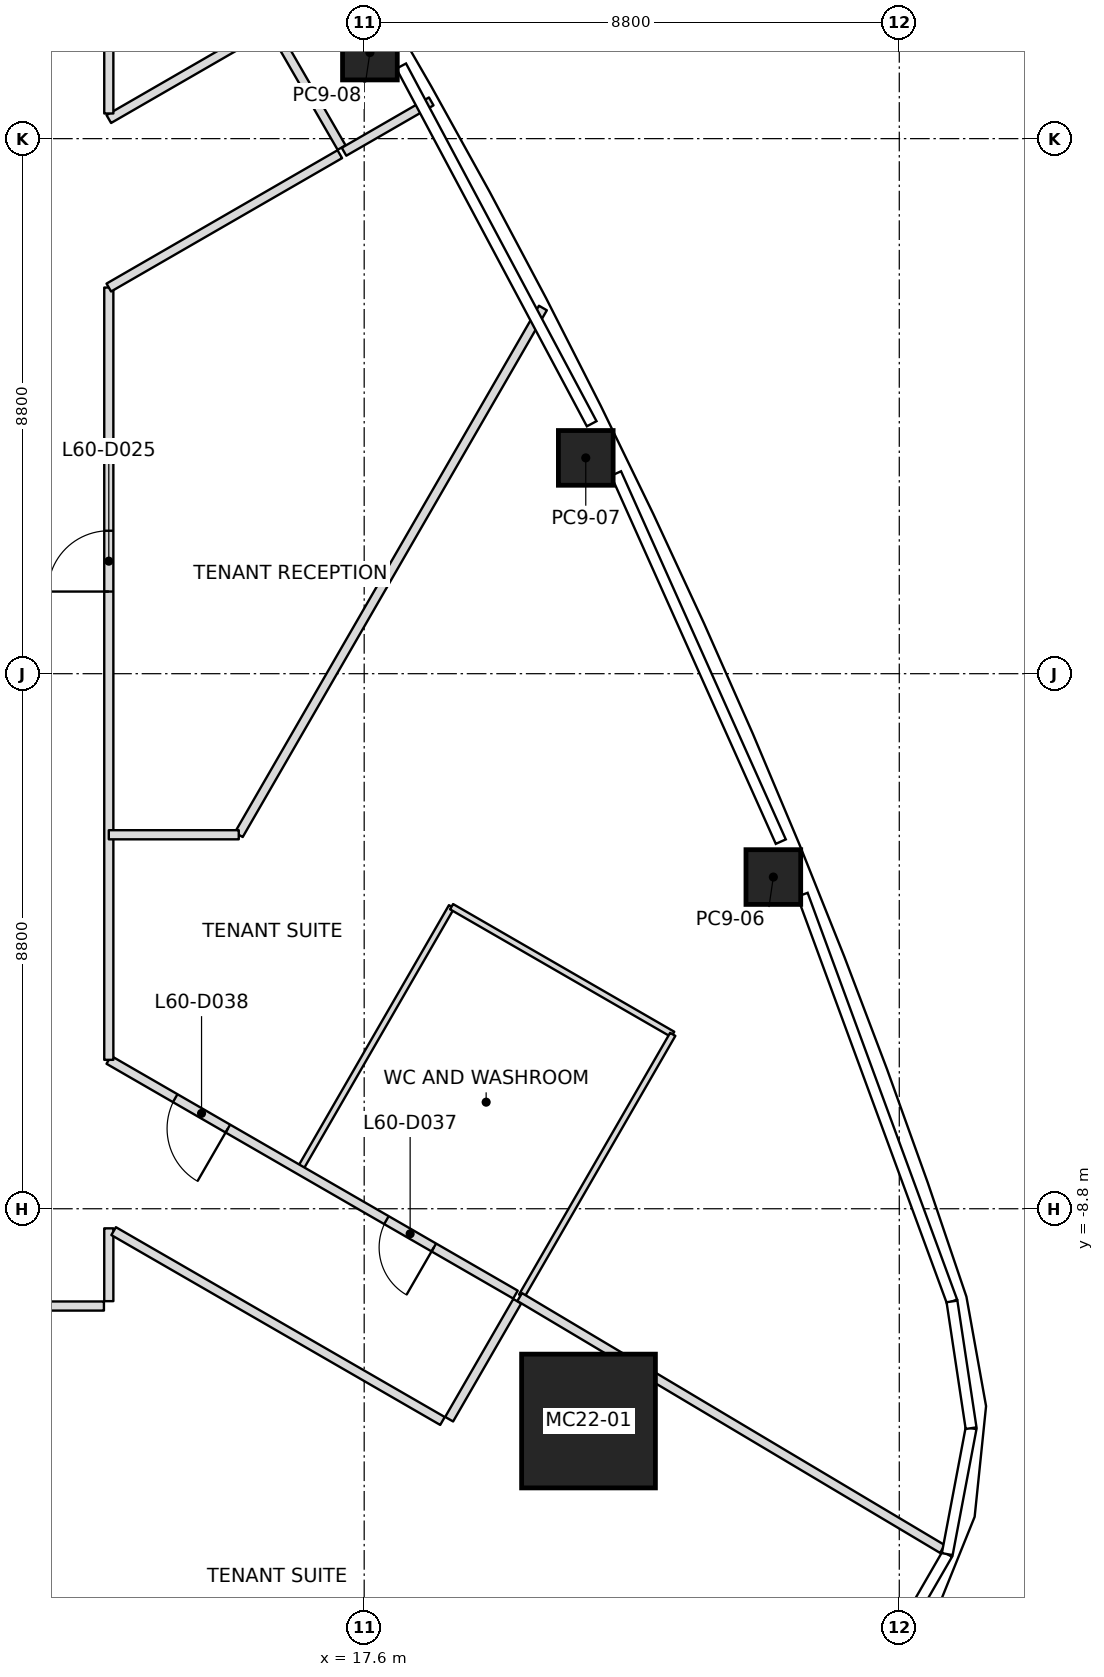
"""IFC4 building model, lengths in metres.
Left out: names, types, materials, properties, quantities, classifications, styles, units other than length and angle.
Written with IfcOpenShell. Run it as: python <this file> out.ifc"""

import sys

from ifc_helpers import new_model, si_unit, direction, frame, frame_2d, origin, origin_2d, place, context, subcontext, project, spatial, rectangle, extrude, element, fill, save


model = new_model("IFC4")
c1 = context("Model", 3, precision=1e-05, world=origin(), true_north=direction((0.0, 1.0)))
c2 = subcontext(c1, "Body", "Model", "MODEL_VIEW")
j1 = project(units=[si_unit("LENGTHUNIT", "METRE"), si_unit("PLANEANGLEUNIT", "RADIAN")], contexts=[c1])
p1 = place(None, origin())
s1 = spatial("IfcSite", under=j1, at=p1, CompositionType="ELEMENT")
p2 = place(p1, origin())
s2 = spatial("IfcBuilding", under=s1, at=p2, CompositionType="ELEMENT")
p3 = place(p2, frame((0.0, 0.0, 267.0)))
s3 = spatial("IfcBuildingStorey", under=s2, at=p3, CompositionType="ELEMENT", Elevation=267.0)
p4 = place(p3, frame((21.289, -12.291, 0.0), z_axis=(-0.027817676907, 0.016043967164, 0.999484250986), x_axis=(0.999613013546, 0.000446478676, 0.027814093645)))
e1 = element("IfcColumn", 1, at=p4, inside=s3, PredefinedType="COLUMN", context=c2, shape_type="SweptSolid", body=[
    extrude(rectangle(XDim=2.2, YDim=2.2, at=origin_2d()), origin(), (0.0, 0.0, 1.0), 4.002),
])
p5 = place(p3, frame((24.329, -3.344, 0.0), z_axis=(-0.017757551143, 0.009946669541, 0.999792845115), x_axis=(-0.376861693588, 0.926132938269, -0.015907374376)))
e2 = element("IfcColumn", 2, at=p5, inside=s3, PredefinedType="COLUMN", context=c2, shape_type="SweptSolid", body=[
    extrude(rectangle(XDim=0.9, YDim=0.9, at=origin_2d()), origin(), (0.0, 0.0, 1.0), 4.001),
])
p6 = place(p3, frame((21.244, 3.549, 0.0), z_axis=(-0.014097691364, 0.002013955909, 0.999898594398), x_axis=(-0.439450311586, 0.8982312302, -0.008005044713)))
e3 = element("IfcColumn", 3, at=p6, inside=s3, PredefinedType="COLUMN", context=c2, shape_type="SweptSolid", body=[
    extrude(rectangle(XDim=0.9, YDim=0.9, at=origin_2d()), origin(), (0.0, 0.0, 1.0), 4.0),
])
p7 = place(p3, frame((17.694, 10.216, 0.0), z_axis=(-0.009887049298, -0.00573692984, 0.999934664812), x_axis=(-0.499975560967, 0.866039512843, 2.5126546e-05)))
e4 = element("IfcColumn", 4, at=p7, inside=s3, PredefinedType="COLUMN", context=c2, shape_type="SweptSolid", body=[
    extrude(rectangle(XDim=0.9, YDim=0.9, at=origin_2d()), origin(), (0.0, 0.0, 1.0), 4.0),
])
p8 = place(p3, frame((20.539, 6.014, 0.0), z_axis=(0.0, 0.0, 1.0), x_axis=(-0.500021018371, -0.866013268482, 0.0)))
e5 = element("IfcWall", 5, at=p8, inside=s3, PredefinedType="PARTITIONING", context=c2, shape_type="SweptSolid", body=[
    extrude(rectangle(XDim=10.004, YDim=0.15, at=frame_2d((5.002, 0.0))), origin(), (0.0, 0.0, 1.0), 3.234),
])
p9 = place(p3, frame((15.537, -2.649, 0.0), z_axis=(0.0, 0.0, 1.0), x_axis=(-1.0, 0.0, 0.0)))
e6 = element("IfcWall", 6, at=p9, inside=s3, PredefinedType="PARTITIONING", context=c2, shape_type="SweptSolid", body=[
    extrude(rectangle(XDim=2.137, YDim=0.15, at=frame_2d((1.069, 0.0))), origin(), (0.0, 0.0, 1.0), 3.317),
])
p10 = place(p3, frame((17.268, 8.584, 0.0), z_axis=(0.0, 0.0, 1.0), x_axis=(0.866021116422, 0.500007425856, 0.0)))
e7 = element("IfcWall", 7, at=p10, inside=s3, PredefinedType="PARTITIONING", context=c2, shape_type="SweptSolid", body=[
    extrude(rectangle(XDim=1.656, YDim=0.15, at=frame_2d((0.828, 0.0))), origin(), (0.0, 0.0, 1.0), 3.234),
])
p11 = place(p3, frame((20.157, -10.252, 0.0), z_axis=(0.0, 0.0, 1.0), x_axis=(0.858979887648, -0.512009328641, 0.0)))
e8 = element("IfcWall", 8, at=p11, inside=s3, PredefinedType="PARTITIONING", context=c2, shape_type="SweptSolid", body=[
    extrude(rectangle(XDim=8.093, YDim=0.15, at=frame_2d((4.047, 0.0))), origin(), (0.0, 0.0, 1.0), 3.234),
])
p12 = place(p3, frame((1.2, -10.4, 0.0), z_axis=(0.0, 0.0, 1.0), x_axis=(1.0, 0.0, 0.0)))
e9 = element("IfcWall", 9, at=p12, inside=s3, PredefinedType="PARTITIONING", context=c2, shape_type="SweptSolid", body=[
    extrude(rectangle(XDim=12.12, YDim=0.15, at=frame_2d((6.06, 0.0))), origin(), (0.0, 0.0, 1.0), 3.317),
])
p13 = place(p12, frame((1.65, 0.0, 0.0)))
e10 = element("IfcOpeningElement", 10, at=p13, cuts=e9, PredefinedType="OPENING", context=c2, shape_type="SweptSolid", body=[
    extrude(rectangle(XDim=0.9, YDim=2.1, at=frame_2d((0.45, 1.05))), frame((0.0, 0.075, 0.0), z_axis=(0.0, -1.0, 0.0), x_axis=(1.0, 0.0, 0.0)), (0.0, 0.0, 1.0), 0.15),
])
p14 = place(p12, frame((7.75, 0.0, 0.0)))
e11 = element("IfcOpeningElement", 11, at=p14, cuts=e9, PredefinedType="OPENING", context=c2, shape_type="SweptSolid", body=[
    extrude(rectangle(XDim=1.0, YDim=2.1, at=frame_2d((0.5, 1.05))), frame((0.0, 0.075, 0.0), z_axis=(0.0, -1.0, 0.0), x_axis=(1.0, 0.0, 0.0)), (0.0, 0.0, 1.0), 0.15),
])
p15 = place(p3, frame((13.4, -10.32, 0.0), z_axis=(0.0, 0.0, 1.0), x_axis=(0.0, 1.0, 0.0)))
e12 = element("IfcWall", 12, at=p15, inside=s3, PredefinedType="PARTITIONING", context=c2, shape_type="SweptSolid", body=[
    extrude(rectangle(XDim=1.198, YDim=0.15, at=frame_2d((0.599, 0.0))), origin(), (0.0, 0.0, 1.0), 3.233),
])
p16 = place(p3, frame((13.479, -9.168, 0.0), z_axis=(0.0, 0.0, 1.0), x_axis=(0.866026089583, -0.49999881216, 0.0)))
e13 = element("IfcWall", 13, at=p16, inside=s3, PredefinedType="PARTITIONING", context=c2, shape_type="SweptSolid", body=[
    extrude(rectangle(XDim=6.245, YDim=0.15, at=frame_2d((3.123, 0.0))), origin(), (0.0, 0.0, 1.0), 3.233),
])
p17 = place(p3, frame((15.999, 10.623, 0.0), z_axis=(0.0, 0.0, 1.0), x_axis=(-0.86600676862, -0.500032275663, 0.0)))
e14 = element("IfcWall", 14, at=p17, inside=s3, PredefinedType="PARTITIONING", context=c2, shape_type="SweptSolid", body=[
    extrude(rectangle(XDim=3.001, YDim=0.15, at=frame_2d((1.5, 0.0))), origin(), (0.0, 0.0, 1.0), 3.45),
])
p18 = place(p3, frame((13.4, 9.214, 0.0), z_axis=(0.0, 0.0, 1.0), x_axis=(0.0, 1.0, 0.0)))
e15 = element("IfcWall", 15, at=p18, inside=s3, PredefinedType="PARTITIONING", context=c2, shape_type="SweptSolid", body=[
    extrude(rectangle(XDim=1.106, YDim=0.15, at=frame_2d((0.553, 0.0))), origin(), (0.0, 0.0, 1.0), 3.45),
])
p19 = place(p3, frame((17.229, 8.654, 0.0), z_axis=(0.0, 0.0, 1.0), x_axis=(-0.500030632641, 0.866007717299, 0.0)))
e16 = element("IfcWall", 16, at=p19, inside=s3, PredefinedType="PARTITIONING", context=c2, shape_type="SweptSolid", body=[
    extrude(rectangle(XDim=2.24, YDim=0.15, at=frame_2d((1.12, 0.0))), origin(), (0.0, 0.0, 1.0), 3.45),
])
p20 = place(p3, frame((20.088, -10.212, 0.0), z_axis=(0.0, 0.0, 1.0), x_axis=(-0.866024490366, 0.500001582084, 0.0)))
e17 = element("IfcWall", 17, at=p20, inside=s3, PredefinedType="PARTITIONING", context=c2, shape_type="SweptSolid", body=[
    extrude(rectangle(XDim=7.723, YDim=0.15, at=frame_2d((3.861, 0.0))), origin(), (0.0, 0.0, 1.0), 3.317),
])
p21 = place(p20, frame((1.55, 0.0, 0.0)))
e18 = element("IfcOpeningElement", 18, at=p21, cuts=e17, PredefinedType="OPENING", context=c2, shape_type="SweptSolid", body=[
    extrude(rectangle(XDim=0.9, YDim=2.1, at=frame_2d((0.45, 1.05))), frame((0.0, 0.075, 0.0), z_axis=(0.0, -1.0, 0.0), x_axis=(1.0, 0.0, 0.0)), (0.0, 0.0, 1.0), 0.15),
])
p22 = place(p20, frame((5.461, 0.0, 0.0)))
e19 = element("IfcOpeningElement", 19, at=p22, cuts=e17, PredefinedType="OPENING", context=c2, shape_type="SweptSolid", body=[
    extrude(rectangle(XDim=1.0, YDim=2.1, at=frame_2d((0.5, 1.05))), frame((0.0, 0.075, 0.0), z_axis=(0.0, -1.0, 0.0), x_axis=(1.0, 0.0, 0.0)), (0.0, 0.0, 1.0), 0.15),
])
p23 = place(p3, frame((13.4, -6.351, 0.0), z_axis=(0.0, 0.0, 1.0), x_axis=(0.0, 1.0, 0.0)))
e20 = element("IfcWall", 20, at=p23, inside=s3, PredefinedType="PARTITIONING", context=c2, shape_type="SweptSolid", body=[
    extrude(rectangle(XDim=12.702, YDim=0.15, at=frame_2d((6.351, 0.0))), origin(), (0.0, 0.0, 1.0), 3.317),
])
p24 = place(p23, frame((7.702, 0.0, 0.0)))
e21 = element("IfcOpeningElement", 21, at=p24, cuts=e20, PredefinedType="OPENING", context=c2, shape_type="SweptSolid", body=[
    extrude(rectangle(XDim=1.0, YDim=2.1, at=frame_2d((0.5, 1.05))), frame((0.0, 0.075, 0.0), z_axis=(0.0, -1.0, 0.0), x_axis=(1.0, 0.0, 0.0)), (0.0, 0.0, 1.0), 0.15),
])
p25 = place(p3, frame((13.4, 6.351, 0.0), z_axis=(0.0, 0.0, 1.0), x_axis=(0.866042871377, 0.499969744021, 0.0)))
e22 = element("IfcWall", 22, at=p25, inside=s3, PredefinedType="PARTITIONING", context=c2, shape_type="SweptSolid", body=[
    extrude(rectangle(XDim=4.387, YDim=0.15, at=frame_2d((2.193, 0.0))), origin(), (0.0, 0.0, 1.0), 3.45),
])
p26 = place(p3, frame((18.997, -12.261, 0.0), z_axis=(0.0, 0.0, 1.0), x_axis=(0.500030632641, 0.866007717299, 0.0)))
e23 = element("IfcWall", 23, at=p26, inside=s3, PredefinedType="PARTITIONING", context=c2, shape_type="SweptSolid", body=[
    extrude(rectangle(XDim=2.24, YDim=0.15, at=frame_2d((1.12, 0.0))), origin(), (0.0, 0.0, 1.0), 3.233),
])
p27 = place(p3, frame((16.552, -8.136, 0.0), z_axis=(0.0, 0.0, 1.0), x_axis=(0.500011595943, 0.86601870876, 0.0)))
e24 = element("IfcWall", 24, at=p27, inside=s3, PredefinedType="PARTITIONING", context=c2, shape_type="SweptSolid", body=[
    extrude(rectangle(XDim=4.97, YDim=0.1, at=frame_2d((2.485, 0.0))), origin(), (0.0, 0.0, 1.0), 3.317),
])
p28 = place(p3, frame((19.037, -3.832, 0.0), z_axis=(0.0, 0.0, 1.0), x_axis=(0.866009402589, -0.500027713859, 0.0)))
e25 = element("IfcWall", 25, at=p28, inside=s3, PredefinedType="PARTITIONING", context=c2, shape_type="SweptSolid", body=[
    extrude(rectangle(XDim=4.2, YDim=0.1, at=frame_2d((2.1, 0.0))), origin(), (0.0, 0.0, 1.0), 3.317),
])
p29 = place(p3, frame((22.674, -5.932, 0.0), z_axis=(0.0, 0.0, 1.0), x_axis=(-0.499974753747, -0.866039979225, 0.0)))
e26 = element("IfcWall", 26, at=p29, inside=s3, PredefinedType="PARTITIONING", context=c2, shape_type="SweptSolid", body=[
    extrude(rectangle(XDim=4.97, YDim=0.1, at=frame_2d((2.485, 0.0))), origin(), (0.0, 0.0, 1.0), 3.45),
])
p30 = place(p24, origin())
e27 = element("IfcDoor", 27, at=p30, inside=s3, OperationType="SINGLE_SWING_RIGHT", PredefinedType="DOOR", context=c2, shape_type="SweptSolid", body=[
    extrude(rectangle(XDim=1.0, YDim=2.1, at=frame_2d((0.5, 1.05))), frame((0.0, 0.025, 0.0), z_axis=(0.0, -1.0, 0.0), x_axis=(1.0, 0.0, 0.0)), (0.0, 0.0, 1.0), 0.05),
])
fill(e21, e27)
p31 = place(p21, origin())
e28 = element("IfcDoor", 28, at=p31, inside=s3, OperationType="SINGLE_SWING_LEFT", PredefinedType="DOOR", context=c2, shape_type="SweptSolid", body=[
    extrude(rectangle(XDim=0.9, YDim=2.1, at=frame_2d((0.45, 1.05))), frame((0.0, 0.025, 0.0), z_axis=(0.0, -1.0, 0.0), x_axis=(1.0, 0.0, 0.0)), (0.0, 0.0, 1.0), 0.05),
])
fill(e18, e28)
p32 = place(p22, origin())
e29 = element("IfcDoor", 29, at=p32, inside=s3, OperationType="SINGLE_SWING_LEFT", PredefinedType="DOOR", context=c2, shape_type="SweptSolid", body=[
    extrude(rectangle(XDim=1.0, YDim=2.1, at=frame_2d((0.5, 1.05))), frame((0.0, 0.025, 0.0), z_axis=(0.0, -1.0, 0.0), x_axis=(1.0, 0.0, 0.0)), (0.0, 0.0, 1.0), 0.05),
])
fill(e19, e29)
save(model, sys.argv[1])
